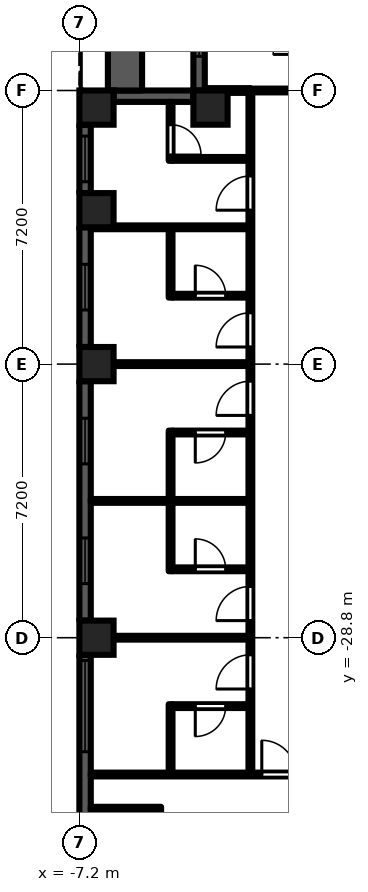
"""IFC4 building model, lengths in metres.
Left out: names, types, materials, properties, quantities, classifications, styles, units other than length and angle.
Written with IfcOpenShell. Run it as: python <this file> out.ifc"""

import sys

from ifc_helpers import new_model, si_unit, direction, frame, frame_2d, origin, origin_2d, place, context, subcontext, project, spatial, rectangle, extrude, element, fill, save


model = new_model("IFC4")
c1 = context("Model", 3, precision=1e-05, world=origin(), true_north=direction((0.0, 1.0)))
c2 = subcontext(c1, "Body", "Model", "MODEL_VIEW")
j1 = project(units=[si_unit("LENGTHUNIT", "METRE"), si_unit("PLANEANGLEUNIT", "RADIAN")], contexts=[c1])
p1 = place(None, origin())
s1 = spatial("IfcSite", under=j1, at=p1, CompositionType="ELEMENT")
p2 = place(p1, origin())
s2 = spatial("IfcBuilding", under=s1, at=p2, CompositionType="ELEMENT")
p3 = place(p2, frame((0.0, 0.0, 69.9)))
s3 = spatial("IfcBuildingStorey", under=s2, at=p3, CompositionType="ELEMENT", Elevation=69.9)
for number, where, z_axis, x_axis in (
    (1, (-6.75, -28.8, 0.0), (0.0, 0.0, 1.0), (1.0, 0.0, 0.0)),
    (2, (-6.75, -21.6, 0.0), (0.0, 0.0, 1.0), (1.0, 0.0, 0.0)),
    (3, (-6.75, -17.55, 0.0), (0.0, 0.0, 1.0), (1.0, 0.0, 0.0)),
    (4, (-6.75, -14.85, 0.0), (0.0, 0.0, 1.0), (1.0, 0.0, 0.0)),
    (5, (-3.75, -14.85, 0.0), (0.0, 0.0, 1.0), (1.0, 0.0, 0.0)),
):
    element("IfcColumn", number, at=place(p3, frame(where, z_axis=z_axis, x_axis=x_axis)), inside=s3, PredefinedType="COLUMN", context=c2, shape_type="SweptSolid", body=[
        extrude(rectangle(XDim=0.9, YDim=0.9, at=origin_2d()), origin(), (0.0, 0.0, 1.0), 3.0),
    ])
p4 = place(p3, frame((-4.05, -7.2, 0.0), z_axis=(0.0, 0.0, 1.0), x_axis=(0.0, -1.0, 0.0)))
e6 = element("IfcWall", 6, at=p4, inside=s3, PredefinedType="SOLIDWALL", context=c2, shape_type="SweptSolid", body=[
    extrude(rectangle(XDim=7.2, YDim=0.3, at=frame_2d((3.6, 0.0))), origin(), (0.0, 0.0, 1.0), 2.1),
])
p5 = place(p4, frame((3.0, 0.0, 0.0)))
e7 = element("IfcOpeningElement", 7, at=p5, cuts=e6, PredefinedType="OPENING", context=c2, shape_type="SweptSolid", body=[
    extrude(rectangle(XDim=1.2, YDim=2.05, at=frame_2d((0.6, 1.025))), frame((0.0, 0.16, 0.0), z_axis=(0.0, -1.0, 0.0), x_axis=(1.0, 0.0, 0.0)), (0.0, 0.0, 1.0), 0.32),
])
p6 = place(p4, frame((0.9, 0.0, 0.2)))
e8 = element("IfcOpeningElement", 8, at=p6, cuts=e6, PredefinedType="OPENING", context=c2, shape_type="SweptSolid", body=[
    extrude(rectangle(XDim=1.8, YDim=1.85, at=frame_2d((0.9, 0.925))), frame((0.0, 0.16, 0.0), z_axis=(0.0, -1.0, 0.0), x_axis=(1.0, 0.0, 0.0)), (0.0, 0.0, 1.0), 0.32),
])
p7 = place(p4, frame((4.5, 0.0, 0.2)))
e9 = element("IfcOpeningElement", 9, at=p7, cuts=e6, PredefinedType="OPENING", context=c2, shape_type="SweptSolid", body=[
    extrude(rectangle(XDim=1.8, YDim=1.85, at=frame_2d((0.9, 0.925))), frame((0.0, 0.16, 0.0), z_axis=(0.0, -1.0, 0.0), x_axis=(1.0, 0.0, 0.0)), (0.0, 0.0, 1.0), 0.32),
])
p8 = place(p3, frame((-4.2, -14.55, 0.0), z_axis=(0.0, 0.0, 1.0), x_axis=(-1.0, 0.0, 0.0)))
e10 = element("IfcWall", 10, at=p8, inside=s3, PredefinedType="SOLIDWALL", context=c2, shape_type="SweptSolid", body=[
    extrude(rectangle(XDim=2.1, YDim=0.3, at=frame_2d((1.05, 0.0))), origin(), (0.0, 0.0, 1.0), 2.1),
])
p9 = place(p3, frame((-7.05, -15.3, 0.0), z_axis=(0.0, 0.0, 1.0), x_axis=(0.0, -1.0, 0.0)))
e11 = element("IfcWall", 11, at=p9, inside=s3, PredefinedType="SOLIDWALL", context=c2, shape_type="SweptSolid", body=[
    extrude(rectangle(XDim=1.8, YDim=0.3, at=frame_2d((0.9, 0.0))), origin(), (0.0, 0.0, 1.0), 2.1),
])
p10 = place(p9, frame((0.3, 0.0, 0.2)))
e12 = element("IfcOpeningElement", 12, at=p10, cuts=e11, PredefinedType="OPENING", context=c2, shape_type="SweptSolid", body=[
    extrude(rectangle(XDim=1.2, YDim=1.85, at=frame_2d((0.6, 0.925))), frame((0.0, 0.16, 0.0), z_axis=(0.0, -1.0, 0.0), x_axis=(1.0, 0.0, 0.0)), (0.0, 0.0, 1.0), 0.32),
])
p11 = place(p3, frame((-7.05, -18.0, 0.0), z_axis=(0.0, 0.0, 1.0), x_axis=(0.0, -1.0, 0.0)))
e13 = element("IfcWall", 13, at=p11, inside=s3, PredefinedType="SOLIDWALL", context=c2, shape_type="SweptSolid", body=[
    extrude(rectangle(XDim=3.15, YDim=0.3, at=frame_2d((1.575, 0.0))), origin(), (0.0, 0.0, 1.0), 2.1),
])
p12 = place(p11, frame((0.975, 0.0, 0.2)))
e14 = element("IfcOpeningElement", 14, at=p12, cuts=e13, PredefinedType="OPENING", context=c2, shape_type="SweptSolid", body=[
    extrude(rectangle(XDim=1.2, YDim=1.85, at=frame_2d((0.6, 0.925))), frame((0.0, 0.16, 0.0), z_axis=(0.0, -1.0, 0.0), x_axis=(1.0, 0.0, 0.0)), (0.0, 0.0, 1.0), 0.32),
])
p13 = place(p3, frame((-7.05, -22.05, 0.0), z_axis=(0.0, 0.0, 1.0), x_axis=(0.0, -1.0, 0.0)))
e15 = element("IfcWall", 15, at=p13, inside=s3, PredefinedType="SOLIDWALL", context=c2, shape_type="SweptSolid", body=[
    extrude(rectangle(XDim=6.3, YDim=0.3, at=frame_2d((3.15, 0.0))), origin(), (0.0, 0.0, 1.0), 2.1),
])
p14 = place(p13, frame((0.975, 0.0, 0.2)))
e16 = element("IfcOpeningElement", 16, at=p14, cuts=e15, PredefinedType="OPENING", context=c2, shape_type="SweptSolid", body=[
    extrude(rectangle(XDim=1.2, YDim=1.85, at=frame_2d((0.6, 0.925))), frame((0.0, 0.16, 0.0), z_axis=(0.0, -1.0, 0.0), x_axis=(1.0, 0.0, 0.0)), (0.0, 0.0, 1.0), 0.32),
])
p15 = place(p13, frame((4.125, 0.0, 0.2)))
e17 = element("IfcOpeningElement", 17, at=p15, cuts=e15, PredefinedType="OPENING", context=c2, shape_type="SweptSolid", body=[
    extrude(rectangle(XDim=1.2, YDim=1.85, at=frame_2d((0.6, 0.925))), frame((0.0, 0.16, 0.0), z_axis=(0.0, -1.0, 0.0), x_axis=(1.0, 0.0, 0.0)), (0.0, 0.0, 1.0), 0.32),
])
p16 = place(p3, frame((-7.05, -29.25, 0.0), z_axis=(0.0, 0.0, 1.0), x_axis=(0.0, -1.0, 0.0)))
e18 = element("IfcWall", 18, at=p16, inside=s3, PredefinedType="SOLIDWALL", context=c2, shape_type="SweptSolid", body=[
    extrude(rectangle(XDim=6.3, YDim=0.3, at=frame_2d((3.15, 0.0))), origin(), (0.0, 0.0, 1.0), 2.1),
])
p17 = place(p16, frame((0.15, 0.0, 0.2)))
e19 = element("IfcOpeningElement", 19, at=p17, cuts=e18, PredefinedType="OPENING", context=c2, shape_type="SweptSolid", body=[
    extrude(rectangle(XDim=2.4, YDim=1.85, at=frame_2d((1.2, 0.925))), frame((0.0, 0.16, 0.0), z_axis=(0.0, -1.0, 0.0), x_axis=(1.0, 0.0, 0.0)), (0.0, 0.0, 1.0), 0.32),
])
p18 = place(p3, frame((-6.0, -14.4, 0.0), z_axis=(0.0, 0.0, 1.0), x_axis=(0.0, 1.0, 0.0)))
e20 = element("IfcWall", 20, at=p18, inside=s3, PredefinedType="PARAPET", context=c2, shape_type="SweptSolid", body=[
    extrude(rectangle(XDim=7.2, YDim=0.9, at=frame_2d((3.6, 0.0))), origin(), (0.0, 0.0, 1.0), 0.8),
])
p19 = place(p3, frame((-6.9, -33.3, 0.0), z_axis=(0.0, 0.0, 1.0), x_axis=(1.0, 0.0, 0.0)))
e21 = element("IfcWall", 21, at=p19, inside=s3, PredefinedType="PARTITIONING", context=c2, shape_type="SweptSolid", body=[
    extrude(rectangle(XDim=1.85, YDim=0.1, at=frame_2d((0.925, 0.0))), origin(), (0.0, 0.0, 1.0), 2.575),
])
p20 = place(p3, frame((-6.9, -32.4, 0.0), z_axis=(0.0, 0.0, 1.0), x_axis=(1.0, 0.0, 0.0)))
e22 = element("IfcWall", 22, at=p20, inside=s3, PredefinedType="PARTITIONING", context=c2, shape_type="SweptSolid", body=[
    extrude(rectangle(XDim=5.625, YDim=0.1, at=frame_2d((2.812, 0.0))), origin(), (0.0, 0.0, 1.0), 2.575),
])
p21 = place(p20, frame((4.5, 0.0, 0.0)))
e23 = element("IfcOpeningElement", 23, at=p21, cuts=e22, PredefinedType="OPENING", context=c2, shape_type="SweptSolid", body=[
    extrude(rectangle(XDim=0.9, YDim=2.1, at=frame_2d((0.45, 1.05))), frame((0.0, 0.06, 0.0), z_axis=(0.0, -1.0, 0.0), x_axis=(1.0, 0.0, 0.0)), (0.0, 0.0, 1.0), 0.12),
])
for number, where, z_axis, x_axis in (
    (24, (-6.9, -28.8, 0.0), (0.0, 0.0, 1.0), (1.0, 0.0, 0.0)),
    (25, (-6.9, -25.2, 0.0), (0.0, 0.0, 1.0), (1.0, 0.0, 0.0)),
    (26, (-6.9, -21.6, 0.0), (0.0, 0.0, 1.0), (1.0, 0.0, 0.0)),
    (27, (-6.9, -18.0, 0.0), (0.0, 0.0, 1.0), (1.0, 0.0, 0.0)),
):
    element("IfcWall", number, at=place(p3, frame(where, z_axis=z_axis, x_axis=x_axis)), inside=s3, PredefinedType="PARTITIONING", context=c2, shape_type="SweptSolid", body=[
        extrude(rectangle(XDim=4.15, YDim=0.1, at=frame_2d((2.075, 0.0))), origin(), (0.0, 0.0, 1.0), 2.575),
    ])
p22 = place(p3, frame((-5.1, -35.05, 0.0), z_axis=(0.0, 0.0, 1.0), x_axis=(0.0, 1.0, 0.0)))
e28 = element("IfcWall", 28, at=p22, inside=s3, PredefinedType="PARTITIONING", context=c2, shape_type="SweptSolid", body=[
    extrude(rectangle(XDim=1.7, YDim=0.1, at=frame_2d((0.85, 0.0))), origin(), (0.0, 0.0, 1.0), 2.575),
])
p23 = place(p22, frame((0.45, 0.0, 0.0)))
e29 = element("IfcOpeningElement", 29, at=p23, cuts=e28, PredefinedType="OPENING", context=c2, shape_type="SweptSolid", body=[
    extrude(rectangle(XDim=0.8, YDim=2.1, at=frame_2d((0.4, 1.05))), frame((0.0, 0.06, 0.0), z_axis=(0.0, -1.0, 0.0), x_axis=(1.0, 0.0, 0.0)), (0.0, 0.0, 1.0), 0.12),
])
p24 = place(p3, frame((-4.8, -32.35, 0.0), z_axis=(0.0, 0.0, 1.0), x_axis=(0.0, 1.0, 0.0)))
e30 = element("IfcWall", 30, at=p24, inside=s3, PredefinedType="PARTITIONING", context=c2, shape_type="SweptSolid", body=[
    extrude(rectangle(XDim=1.8, YDim=0.1, at=frame_2d((0.9, 0.0))), origin(), (0.0, 0.0, 1.0), 2.575),
])
p25 = place(p3, frame((-4.75, -30.6, 0.0), z_axis=(0.0, 0.0, 1.0), x_axis=(1.0, 0.0, 0.0)))
e31 = element("IfcWall", 31, at=p25, inside=s3, PredefinedType="PARTITIONING", context=c2, shape_type="SweptSolid", body=[
    extrude(rectangle(XDim=2.0, YDim=0.1, at=frame_2d((1.0, 0.0))), origin(), (0.0, 0.0, 1.0), 2.575),
])
p26 = place(p25, frame((0.6, 0.0, 0.0)))
e32 = element("IfcOpeningElement", 32, at=p26, cuts=e31, PredefinedType="OPENING", context=c2, shape_type="SweptSolid", body=[
    extrude(rectangle(XDim=0.8, YDim=2.1, at=frame_2d((0.4, 1.05))), frame((0.0, 0.06, 0.0), z_axis=(0.0, -1.0, 0.0), x_axis=(1.0, 0.0, 0.0)), (0.0, 0.0, 1.0), 0.12),
])
p27 = place(p3, frame((-4.8, -27.05, 0.0), z_axis=(0.0, 0.0, 1.0), x_axis=(0.0, 1.0, 0.0)))
e33 = element("IfcWall", 33, at=p27, inside=s3, PredefinedType="PARTITIONING", context=c2, shape_type="SweptSolid", body=[
    extrude(rectangle(XDim=3.7, YDim=0.1, at=frame_2d((1.85, 0.0))), origin(), (0.0, 0.0, 1.0), 2.575),
])
p28 = place(p3, frame((-4.75, -27.0, 0.0), z_axis=(0.0, 0.0, 1.0), x_axis=(1.0, 0.0, 0.0)))
e34 = element("IfcWall", 34, at=p28, inside=s3, PredefinedType="PARTITIONING", context=c2, shape_type="SweptSolid", body=[
    extrude(rectangle(XDim=2.0, YDim=0.1, at=frame_2d((1.0, 0.0))), origin(), (0.0, 0.0, 1.0), 2.575),
])
p29 = place(p28, frame((0.6, 0.0, 0.0)))
e35 = element("IfcOpeningElement", 35, at=p29, cuts=e34, PredefinedType="OPENING", context=c2, shape_type="SweptSolid", body=[
    extrude(rectangle(XDim=0.8, YDim=2.1, at=frame_2d((0.4, 1.05))), frame((0.0, 0.06, 0.0), z_axis=(0.0, -1.0, 0.0), x_axis=(1.0, 0.0, 0.0)), (0.0, 0.0, 1.0), 0.12),
])
p30 = place(p3, frame((-4.75, -23.4, 0.0), z_axis=(0.0, 0.0, 1.0), x_axis=(1.0, 0.0, 0.0)))
e36 = element("IfcWall", 36, at=p30, inside=s3, PredefinedType="PARTITIONING", context=c2, shape_type="SweptSolid", body=[
    extrude(rectangle(XDim=2.0, YDim=0.1, at=frame_2d((1.0, 0.0))), origin(), (0.0, 0.0, 1.0), 2.575),
])
p31 = place(p30, frame((0.6, 0.0, 0.0)))
e37 = element("IfcOpeningElement", 37, at=p31, cuts=e36, PredefinedType="OPENING", context=c2, shape_type="SweptSolid", body=[
    extrude(rectangle(XDim=0.8, YDim=2.1, at=frame_2d((0.4, 1.05))), frame((0.0, 0.06, 0.0), z_axis=(0.0, -1.0, 0.0), x_axis=(1.0, 0.0, 0.0)), (0.0, 0.0, 1.0), 0.12),
])
p32 = place(p3, frame((-4.8, -19.85, 0.0), z_axis=(0.0, 0.0, 1.0), x_axis=(0.0, 1.0, 0.0)))
e38 = element("IfcWall", 38, at=p32, inside=s3, PredefinedType="PARTITIONING", context=c2, shape_type="SweptSolid", body=[
    extrude(rectangle(XDim=1.8, YDim=0.1, at=frame_2d((0.9, 0.0))), origin(), (0.0, 0.0, 1.0), 2.575),
])
p33 = place(p3, frame((-4.75, -19.8, 0.0), z_axis=(0.0, 0.0, 1.0), x_axis=(1.0, 0.0, 0.0)))
e39 = element("IfcWall", 39, at=p33, inside=s3, PredefinedType="PARTITIONING", context=c2, shape_type="SweptSolid", body=[
    extrude(rectangle(XDim=2.0, YDim=0.1, at=frame_2d((1.0, 0.0))), origin(), (0.0, 0.0, 1.0), 2.575),
])
p34 = place(p33, frame((0.6, 0.0, 0.0)))
e40 = element("IfcOpeningElement", 40, at=p34, cuts=e39, PredefinedType="OPENING", context=c2, shape_type="SweptSolid", body=[
    extrude(rectangle(XDim=0.8, YDim=2.1, at=frame_2d((0.4, 1.05))), frame((0.0, 0.06, 0.0), z_axis=(0.0, -1.0, 0.0), x_axis=(1.0, 0.0, 0.0)), (0.0, 0.0, 1.0), 0.12),
])
p35 = place(p3, frame((-4.8, -16.25, 0.0), z_axis=(0.0, 0.0, 1.0), x_axis=(0.0, 1.0, 0.0)))
e41 = element("IfcWall", 41, at=p35, inside=s3, PredefinedType="PARTITIONING", context=c2, shape_type="SweptSolid", body=[
    extrude(rectangle(XDim=1.55, YDim=0.1, at=frame_2d((0.775, 0.0))), origin(), (0.0, 0.0, 1.0), 2.575),
])
p36 = place(p35, frame((0.15, 0.0, 0.0)))
e42 = element("IfcOpeningElement", 42, at=p36, cuts=e41, PredefinedType="OPENING", context=c2, shape_type="SweptSolid", body=[
    extrude(rectangle(XDim=0.8, YDim=2.1, at=frame_2d((0.4, 1.05))), frame((0.0, 0.06, 0.0), z_axis=(0.0, -1.0, 0.0), x_axis=(1.0, 0.0, 0.0)), (0.0, 0.0, 1.0), 0.12),
])
p37 = place(p3, frame((-4.75, -16.2, 0.0), z_axis=(0.0, 0.0, 1.0), x_axis=(1.0, 0.0, 0.0)))
e43 = element("IfcWall", 43, at=p37, inside=s3, PredefinedType="PARTITIONING", context=c2, shape_type="SweptSolid", body=[
    extrude(rectangle(XDim=2.0, YDim=0.1, at=frame_2d((1.0, 0.0))), origin(), (0.0, 0.0, 1.0), 2.575),
])
p38 = place(p3, frame((-3.9, -14.4, 0.0), z_axis=(0.0, 0.0, 1.0), x_axis=(1.0, 0.0, 0.0)))
e44 = element("IfcWall", 44, at=p38, inside=s3, PredefinedType="PARTITIONING", context=c2, shape_type="SweptSolid", body=[
    extrude(rectangle(XDim=1.2, YDim=0.125, at=frame_2d((0.6, 0.0))), origin(), (0.0, 0.0, 1.0), 2.575),
])
p39 = place(p3, frame((-2.7, -32.35, 0.0), z_axis=(0.0, 0.0, 1.0), x_axis=(0.0, 1.0, 0.0)))
e45 = element("IfcWall", 45, at=p39, inside=s3, PredefinedType="PARTITIONING", context=c2, shape_type="SweptSolid", body=[
    extrude(rectangle(XDim=17.888, YDim=0.1, at=frame_2d((8.944, 0.0))), origin(), (0.0, 0.0, 1.0), 2.575),
])
p40 = place(p39, frame((2.2, 0.0, 0.0)))
e46 = element("IfcOpeningElement", 46, at=p40, cuts=e45, PredefinedType="OPENING", context=c2, shape_type="SweptSolid", body=[
    extrude(rectangle(XDim=0.9, YDim=2.1, at=frame_2d((0.45, 1.05))), frame((0.0, 0.06, 0.0), z_axis=(0.0, -1.0, 0.0), x_axis=(1.0, 0.0, 0.0)), (0.0, 0.0, 1.0), 0.12),
])
p41 = place(p39, frame((4.0, 0.0, 0.0)))
e47 = element("IfcOpeningElement", 47, at=p41, cuts=e45, PredefinedType="OPENING", context=c2, shape_type="SweptSolid", body=[
    extrude(rectangle(XDim=0.9, YDim=2.1, at=frame_2d((0.45, 1.05))), frame((0.0, 0.06, 0.0), z_axis=(0.0, -1.0, 0.0), x_axis=(1.0, 0.0, 0.0)), (0.0, 0.0, 1.0), 0.12),
])
p42 = place(p39, frame((9.4, 0.0, 0.0)))
e48 = element("IfcOpeningElement", 48, at=p42, cuts=e45, PredefinedType="OPENING", context=c2, shape_type="SweptSolid", body=[
    extrude(rectangle(XDim=0.9, YDim=2.1, at=frame_2d((0.45, 1.05))), frame((0.0, 0.06, 0.0), z_axis=(0.0, -1.0, 0.0), x_axis=(1.0, 0.0, 0.0)), (0.0, 0.0, 1.0), 0.12),
])
p43 = place(p39, frame((11.2, 0.0, 0.0)))
e49 = element("IfcOpeningElement", 49, at=p43, cuts=e45, PredefinedType="OPENING", context=c2, shape_type="SweptSolid", body=[
    extrude(rectangle(XDim=0.9, YDim=2.1, at=frame_2d((0.45, 1.05))), frame((0.0, 0.06, 0.0), z_axis=(0.0, -1.0, 0.0), x_axis=(1.0, 0.0, 0.0)), (0.0, 0.0, 1.0), 0.12),
])
p44 = place(p39, frame((14.8, 0.0, 0.0)))
e50 = element("IfcOpeningElement", 50, at=p44, cuts=e45, PredefinedType="OPENING", context=c2, shape_type="SweptSolid", body=[
    extrude(rectangle(XDim=0.9, YDim=2.1, at=frame_2d((0.45, 1.05))), frame((0.0, 0.06, 0.0), z_axis=(0.0, -1.0, 0.0), x_axis=(1.0, 0.0, 0.0)), (0.0, 0.0, 1.0), 0.12),
])
p45 = place(p3, frame((-2.7, -14.4, 0.0), z_axis=(0.0, 0.0, 1.0), x_axis=(1.0, 0.0, 0.0)))
e51 = element("IfcWall", 51, at=p45, inside=s3, PredefinedType="PARTITIONING", context=c2, shape_type="SweptSolid", body=[
    extrude(rectangle(XDim=1.425, YDim=0.1, at=frame_2d((0.712, 0.0))), origin(), (0.0, 0.0, 1.0), 2.575),
])
p46 = place(p7, origin())
e52 = element("IfcWindow", 52, at=p46, inside=s3, PartitioningType="SINGLE_PANEL", PredefinedType="WINDOW", context=c2, shape_type="SweptSolid", body=[
    extrude(rectangle(XDim=1.8, YDim=1.85, at=frame_2d((0.9, 0.925))), frame((0.0, 0.03, 0.0), z_axis=(0.0, -1.0, 0.0), x_axis=(1.0, 0.0, 0.0)), (0.0, 0.0, 1.0), 0.06),
])
fill(e9, e52)
p47 = place(p10, origin())
e53 = element("IfcWindow", 53, at=p47, inside=s3, PartitioningType="SINGLE_PANEL", PredefinedType="WINDOW", context=c2, shape_type="SweptSolid", body=[
    extrude(rectangle(XDim=1.2, YDim=1.85, at=frame_2d((0.6, 0.925))), frame((0.0, 0.03, 0.0), z_axis=(0.0, -1.0, 0.0), x_axis=(1.0, 0.0, 0.0)), (0.0, 0.0, 1.0), 0.06),
])
fill(e12, e53)
p48 = place(p12, origin())
e54 = element("IfcWindow", 54, at=p48, inside=s3, PartitioningType="SINGLE_PANEL", PredefinedType="WINDOW", context=c2, shape_type="SweptSolid", body=[
    extrude(rectangle(XDim=1.2, YDim=1.85, at=frame_2d((0.6, 0.925))), frame((0.0, 0.03, 0.0), z_axis=(0.0, -1.0, 0.0), x_axis=(1.0, 0.0, 0.0)), (0.0, 0.0, 1.0), 0.06),
])
fill(e14, e54)
p49 = place(p14, origin())
e55 = element("IfcWindow", 55, at=p49, inside=s3, PartitioningType="SINGLE_PANEL", PredefinedType="WINDOW", context=c2, shape_type="SweptSolid", body=[
    extrude(rectangle(XDim=1.2, YDim=1.85, at=frame_2d((0.6, 0.925))), frame((0.0, 0.03, 0.0), z_axis=(0.0, -1.0, 0.0), x_axis=(1.0, 0.0, 0.0)), (0.0, 0.0, 1.0), 0.06),
])
fill(e16, e55)
p50 = place(p15, origin())
e56 = element("IfcWindow", 56, at=p50, inside=s3, PartitioningType="SINGLE_PANEL", PredefinedType="WINDOW", context=c2, shape_type="SweptSolid", body=[
    extrude(rectangle(XDim=1.2, YDim=1.85, at=frame_2d((0.6, 0.925))), frame((0.0, 0.03, 0.0), z_axis=(0.0, -1.0, 0.0), x_axis=(1.0, 0.0, 0.0)), (0.0, 0.0, 1.0), 0.06),
])
fill(e17, e56)
p51 = place(p17, origin())
e57 = element("IfcWindow", 57, at=p51, inside=s3, PartitioningType="SINGLE_PANEL", PredefinedType="WINDOW", context=c2, shape_type="SweptSolid", body=[
    extrude(rectangle(XDim=2.4, YDim=1.85, at=frame_2d((1.2, 0.925))), frame((0.0, 0.03, 0.0), z_axis=(0.0, -1.0, 0.0), x_axis=(1.0, 0.0, 0.0)), (0.0, 0.0, 1.0), 0.06),
])
fill(e19, e57)
p52 = place(p40, origin())
e58 = element("IfcDoor", 58, at=p52, inside=s3, OperationType="SINGLE_SWING_LEFT", PredefinedType="DOOR", context=c2, shape_type="SweptSolid", body=[
    extrude(rectangle(XDim=0.9, YDim=2.1, at=frame_2d((0.45, 1.05))), frame((0.0, 0.025, 0.0), z_axis=(0.0, -1.0, 0.0), x_axis=(1.0, 0.0, 0.0)), (0.0, 0.0, 1.0), 0.05),
])
fill(e46, e58)
p53 = place(p41, origin())
e59 = element("IfcDoor", 59, at=p53, inside=s3, OperationType="SINGLE_SWING_LEFT", PredefinedType="DOOR", context=c2, shape_type="SweptSolid", body=[
    extrude(rectangle(XDim=0.9, YDim=2.1, at=frame_2d((0.45, 1.05))), frame((0.0, 0.025, 0.0), z_axis=(0.0, -1.0, 0.0), x_axis=(1.0, 0.0, 0.0)), (0.0, 0.0, 1.0), 0.05),
])
fill(e47, e59)
p54 = place(p42, origin())
e60 = element("IfcDoor", 60, at=p54, inside=s3, OperationType="SINGLE_SWING_LEFT", PredefinedType="DOOR", context=c2, shape_type="SweptSolid", body=[
    extrude(rectangle(XDim=0.9, YDim=2.1, at=frame_2d((0.45, 1.05))), frame((0.0, 0.025, 0.0), z_axis=(0.0, -1.0, 0.0), x_axis=(1.0, 0.0, 0.0)), (0.0, 0.0, 1.0), 0.05),
])
fill(e48, e60)
p55 = place(p43, origin())
e61 = element("IfcDoor", 61, at=p55, inside=s3, OperationType="SINGLE_SWING_LEFT", PredefinedType="DOOR", context=c2, shape_type="SweptSolid", body=[
    extrude(rectangle(XDim=0.9, YDim=2.1, at=frame_2d((0.45, 1.05))), frame((0.0, 0.025, 0.0), z_axis=(0.0, -1.0, 0.0), x_axis=(1.0, 0.0, 0.0)), (0.0, 0.0, 1.0), 0.05),
])
fill(e49, e61)
p56 = place(p44, origin())
e62 = element("IfcDoor", 62, at=p56, inside=s3, OperationType="SINGLE_SWING_LEFT", PredefinedType="DOOR", context=c2, shape_type="SweptSolid", body=[
    extrude(rectangle(XDim=0.9, YDim=2.1, at=frame_2d((0.45, 1.05))), frame((0.0, 0.025, 0.0), z_axis=(0.0, -1.0, 0.0), x_axis=(1.0, 0.0, 0.0)), (0.0, 0.0, 1.0), 0.05),
])
fill(e50, e62)
p57 = place(p21, origin())
e63 = element("IfcDoor", 63, at=p57, inside=s3, OperationType="SINGLE_SWING_LEFT", PredefinedType="DOOR", context=c2, shape_type="SweptSolid", body=[
    extrude(rectangle(XDim=0.9, YDim=2.1, at=frame_2d((0.45, 1.05))), frame((0.0, 0.025, 0.0), z_axis=(0.0, -1.0, 0.0), x_axis=(1.0, 0.0, 0.0)), (0.0, 0.0, 1.0), 0.05),
])
fill(e23, e63)
p58 = place(p36, frame((0.8, 0.0, 0.0), z_axis=(0.0, 0.0, 1.0), x_axis=(-1.0, 0.0, 0.0)))
e64 = element("IfcDoor", 64, at=p58, inside=s3, OperationType="SINGLE_SWING_RIGHT", PredefinedType="DOOR", context=c2, shape_type="SweptSolid", body=[
    extrude(rectangle(XDim=0.8, YDim=2.1, at=frame_2d((0.4, 1.05))), frame((0.0, 0.025, 0.0), z_axis=(0.0, -1.0, 0.0), x_axis=(1.0, 0.0, 0.0)), (0.0, 0.0, 1.0), 0.05),
])
fill(e42, e64)
p59 = place(p34, origin())
e65 = element("IfcDoor", 65, at=p59, inside=s3, OperationType="SINGLE_SWING_LEFT", PredefinedType="DOOR", context=c2, shape_type="SweptSolid", body=[
    extrude(rectangle(XDim=0.8, YDim=2.1, at=frame_2d((0.4, 1.05))), frame((0.0, 0.025, 0.0), z_axis=(0.0, -1.0, 0.0), x_axis=(1.0, 0.0, 0.0)), (0.0, 0.0, 1.0), 0.05),
])
fill(e40, e65)
p60 = place(p31, frame((0.8, 0.0, 0.0), z_axis=(0.0, 0.0, 1.0), x_axis=(-1.0, 0.0, 0.0)))
e66 = element("IfcDoor", 66, at=p60, inside=s3, OperationType="SINGLE_SWING_RIGHT", PredefinedType="DOOR", context=c2, shape_type="SweptSolid", body=[
    extrude(rectangle(XDim=0.8, YDim=2.1, at=frame_2d((0.4, 1.05))), frame((0.0, 0.025, 0.0), z_axis=(0.0, -1.0, 0.0), x_axis=(1.0, 0.0, 0.0)), (0.0, 0.0, 1.0), 0.05),
])
fill(e37, e66)
p61 = place(p29, origin())
e67 = element("IfcDoor", 67, at=p61, inside=s3, OperationType="SINGLE_SWING_LEFT", PredefinedType="DOOR", context=c2, shape_type="SweptSolid", body=[
    extrude(rectangle(XDim=0.8, YDim=2.1, at=frame_2d((0.4, 1.05))), frame((0.0, 0.025, 0.0), z_axis=(0.0, -1.0, 0.0), x_axis=(1.0, 0.0, 0.0)), (0.0, 0.0, 1.0), 0.05),
])
fill(e35, e67)
p62 = place(p26, frame((0.8, 0.0, 0.0), z_axis=(0.0, 0.0, 1.0), x_axis=(-1.0, 0.0, 0.0)))
e68 = element("IfcDoor", 68, at=p62, inside=s3, OperationType="SINGLE_SWING_RIGHT", PredefinedType="DOOR", context=c2, shape_type="SweptSolid", body=[
    extrude(rectangle(XDim=0.8, YDim=2.1, at=frame_2d((0.4, 1.05))), frame((0.0, 0.025, 0.0), z_axis=(0.0, -1.0, 0.0), x_axis=(1.0, 0.0, 0.0)), (0.0, 0.0, 1.0), 0.05),
])
fill(e32, e68)
save(model, sys.argv[1])
